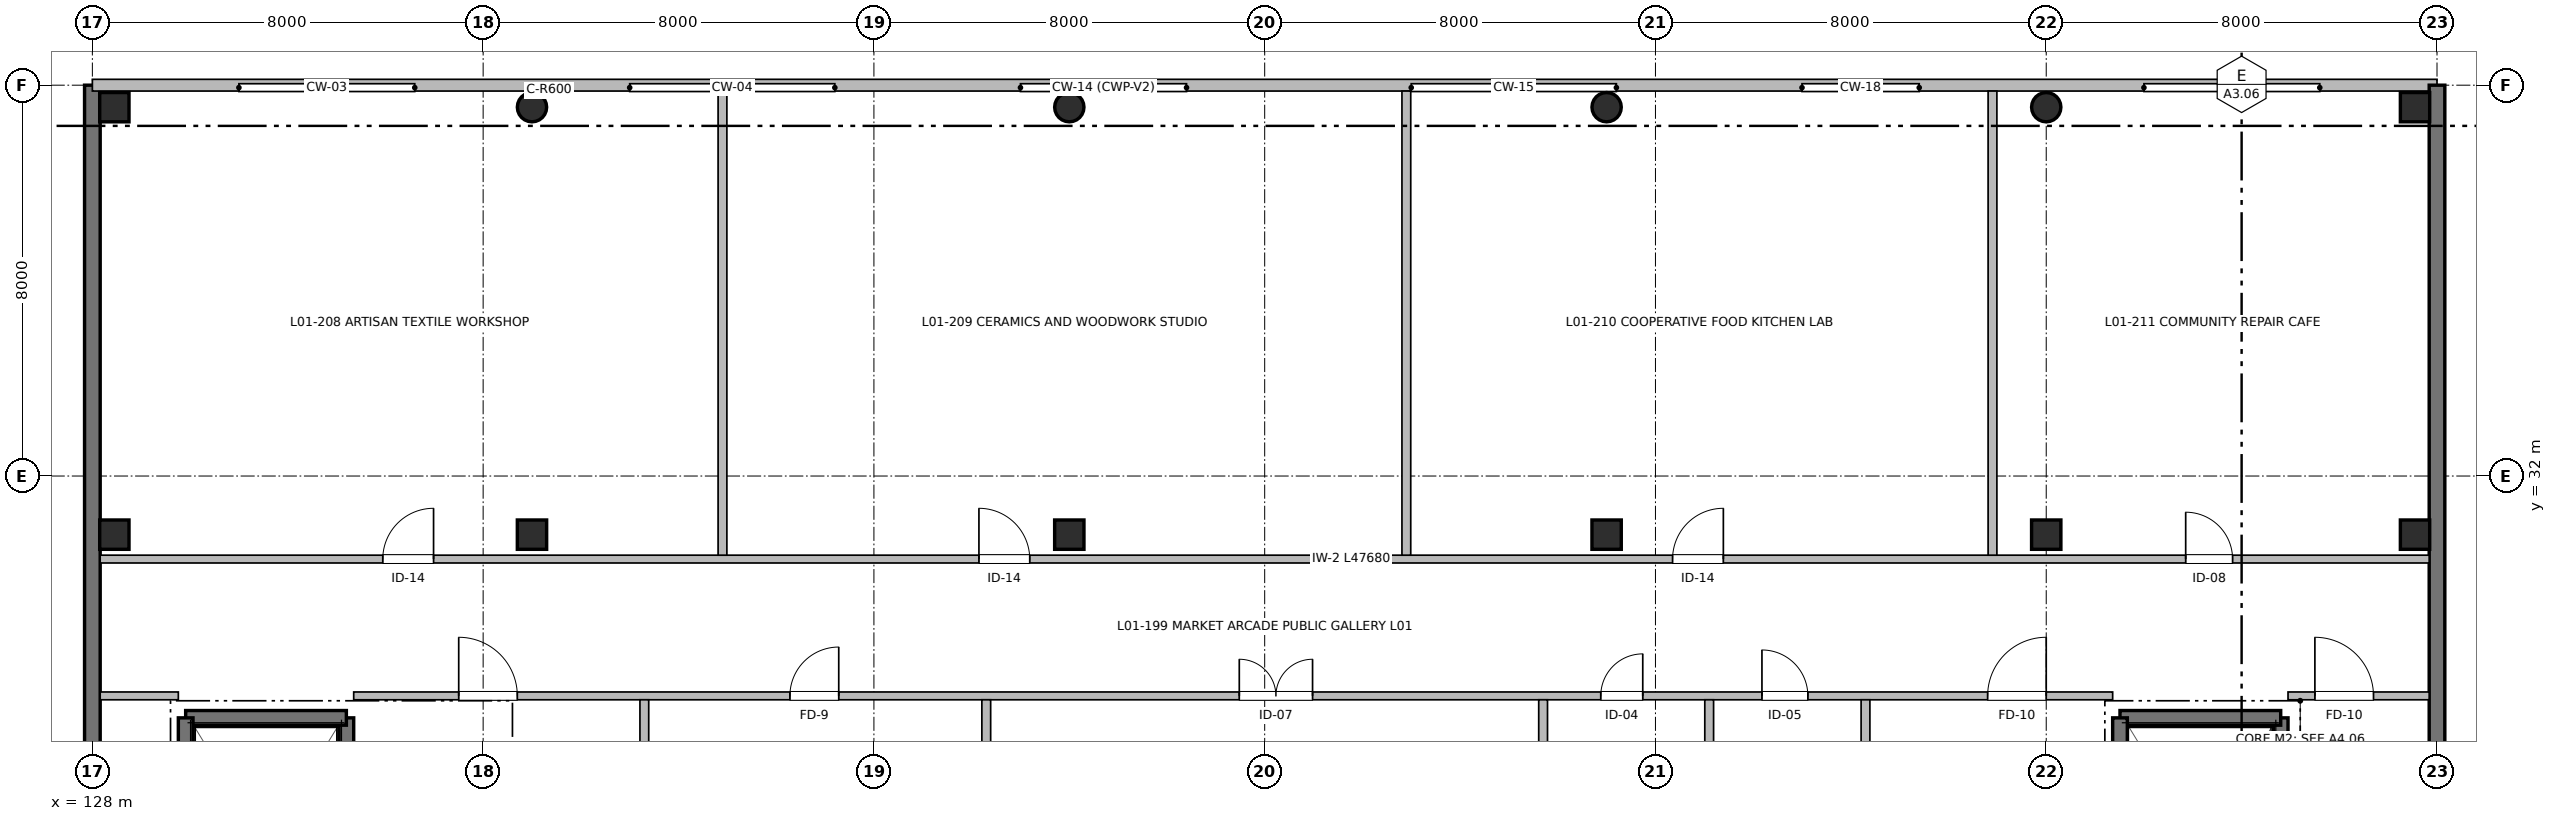
"""IFC4 building model, lengths in metres.
Left out: names, types, materials, properties, quantities, classifications, styles, units other than length and angle.
Written with IfcOpenShell. Run it as: python <this file> out.ifc"""

import sys

from ifc_helpers import new_model, si_unit, direction, frame, frame_2d, origin, origin_2d, place, context, subcontext, project, spatial, rectangle, circle, extrude, element, fill, save


model = new_model("IFC4")
c1 = context("Model", 3, precision=1e-05, world=origin(), true_north=direction((0.0, 1.0)))
c2 = subcontext(c1, "Body", "Model", "MODEL_VIEW")
j1 = project(units=[si_unit("LENGTHUNIT", "METRE"), si_unit("PLANEANGLEUNIT", "RADIAN")], contexts=[c1])
p1 = place(None, origin())
s1 = spatial("IfcSite", under=j1, at=p1, CompositionType="ELEMENT")
p2 = place(p1, origin())
s2 = spatial("IfcBuilding", under=s1, at=p2, CompositionType="ELEMENT")
p3 = place(p2, frame((0.0, 0.0, 4.16)))
s3 = spatial("IfcBuildingStorey", under=s2, at=p3, CompositionType="ELEMENT", Elevation=4.16)
for number, where, z_axis, x_axis in (
    (1, (128.45, 30.8, 0.0), (0.0, 0.0, 1.0), (1.0, 0.0, 0.0)),
    (2, (128.45, 39.55, 0.0), (0.0, 0.0, 1.0), (1.0, 0.0, 0.0)),
    (3, (137.0, 30.8, 0.0), (0.0, 0.0, 1.0), (1.0, 0.0, 0.0)),
):
    element("IfcColumn", number, at=place(p3, frame(where, z_axis=z_axis, x_axis=x_axis)), inside=s3, PredefinedType="COLUMN", context=c2, shape_type="SweptSolid", body=[
        extrude(rectangle(XDim=0.6, YDim=0.6, at=origin_2d()), origin(), (0.0, 0.0, 1.0), 3.2),
    ])
p4 = place(p3, frame((137.0, 39.55, 0.0), z_axis=(0.0, 0.0, 1.0), x_axis=(1.0, 0.0, 0.0)))
e4 = element("IfcColumn", 4, at=p4, inside=s3, PredefinedType="COLUMN", context=c2, shape_type="SweptSolid", body=[
    extrude(circle(Radius=0.3, at=origin_2d()), origin(), (0.0, 0.0, 1.0), 3.2),
])
p5 = place(p3, frame((148.0, 30.8, 0.0), z_axis=(0.0, 0.0, 1.0), x_axis=(1.0, 0.0, 0.0)))
e5 = element("IfcColumn", 5, at=p5, inside=s3, PredefinedType="COLUMN", context=c2, shape_type="SweptSolid", body=[
    extrude(rectangle(XDim=0.6, YDim=0.6, at=origin_2d()), origin(), (0.0, 0.0, 1.0), 3.2),
])
p6 = place(p3, frame((148.0, 39.55, 0.0), z_axis=(0.0, 0.0, 1.0), x_axis=(1.0, 0.0, 0.0)))
e6 = element("IfcColumn", 6, at=p6, inside=s3, PredefinedType="COLUMN", context=c2, shape_type="SweptSolid", body=[
    extrude(circle(Radius=0.3, at=origin_2d()), origin(), (0.0, 0.0, 1.0), 3.2),
])
p7 = place(p3, frame((159.0, 30.8, 0.0), z_axis=(0.0, 0.0, 1.0), x_axis=(1.0, 0.0, 0.0)))
e7 = element("IfcColumn", 7, at=p7, inside=s3, PredefinedType="COLUMN", context=c2, shape_type="SweptSolid", body=[
    extrude(rectangle(XDim=0.6, YDim=0.6, at=origin_2d()), origin(), (0.0, 0.0, 1.0), 3.2),
])
p8 = place(p3, frame((159.0, 39.55, 0.0), z_axis=(0.0, 0.0, 1.0), x_axis=(1.0, 0.0, 0.0)))
e8 = element("IfcColumn", 8, at=p8, inside=s3, PredefinedType="COLUMN", context=c2, shape_type="SweptSolid", body=[
    extrude(circle(Radius=0.3, at=origin_2d()), origin(), (0.0, 0.0, 1.0), 3.2),
])
p9 = place(p3, frame((168.0, 30.8, 0.0), z_axis=(0.0, 0.0, 1.0), x_axis=(1.0, 0.0, 0.0)))
e9 = element("IfcColumn", 9, at=p9, inside=s3, PredefinedType="COLUMN", context=c2, shape_type="SweptSolid", body=[
    extrude(rectangle(XDim=0.6, YDim=0.6, at=origin_2d()), origin(), (0.0, 0.0, 1.0), 3.2),
])
p10 = place(p3, frame((168.0, 39.55, 0.0), z_axis=(0.0, 0.0, 1.0), x_axis=(1.0, 0.0, 0.0)))
e10 = element("IfcColumn", 10, at=p10, inside=s3, PredefinedType="COLUMN", context=c2, shape_type="SweptSolid", body=[
    extrude(circle(Radius=0.3, at=origin_2d()), origin(), (0.0, 0.0, 1.0), 3.2),
])
for number, where, z_axis, x_axis in (
    (11, (175.55, 30.8, 0.0), (0.0, 0.0, 1.0), (1.0, 0.0, 0.0)),
    (12, (175.55, 39.55, 0.0), (0.0, 0.0, 1.0), (1.0, 0.0, 0.0)),
):
    element("IfcColumn", number, at=place(p3, frame(where, z_axis=z_axis, x_axis=x_axis)), inside=s3, PredefinedType="COLUMN", context=c2, shape_type="SweptSolid", body=[
        extrude(rectangle(XDim=0.6, YDim=0.6, at=origin_2d()), origin(), (0.0, 0.0, 1.0), 3.2),
    ])
p11 = place(p3, frame((128.0, 12.0, 0.0), z_axis=(0.0, 0.0, 1.0), x_axis=(0.0, 1.0, 0.0)))
e13 = element("IfcWall", 13, at=p11, inside=s3, PredefinedType="SHEAR", context=c2, shape_type="SweptSolid", body=[
    extrude(rectangle(XDim=28.0, YDim=0.32, at=frame_2d((14.0, 0.0))), origin(), (0.0, 0.0, 1.0), 2.94),
])
p12 = place(p3, frame((128.0, 40.0, 0.0), z_axis=(0.0, 0.0, 1.0), x_axis=(1.0, 0.0, 0.0)))
e14 = element("IfcWall", 14, at=p12, inside=s3, PredefinedType="SOLIDWALL", context=c2, shape_type="SweptSolid", body=[
    extrude(rectangle(XDim=48.0, YDim=0.24, at=frame_2d((24.0, 0.0))), origin(), (0.0, 0.0, 1.0), 2.94),
])
p13 = place(p3, frame((176.0, 40.0, 0.0), z_axis=(0.0, 0.0, 1.0), x_axis=(0.0, -1.0, 0.0)))
e15 = element("IfcWall", 15, at=p13, inside=s3, PredefinedType="SHEAR", context=c2, shape_type="SweptSolid", body=[
    extrude(rectangle(XDim=28.0, YDim=0.32, at=frame_2d((14.0, 0.0))), origin(), (0.0, 0.0, 1.0), 2.94),
])
p14 = place(p3, frame((133.2, 27.05, 0.0), z_axis=(0.0, 0.0, 1.0), x_axis=(0.0, -1.0, 0.0)))
e16 = element("IfcWall", 16, at=p14, inside=s3, PredefinedType="SHEAR", context=c2, shape_type="SweptSolid", body=[
    extrude(rectangle(XDim=6.9, YDim=0.3, at=frame_2d((3.45, 0.0))), origin(), (0.0, 0.0, 1.0), 3.2),
])
p15 = place(p14, frame((5.3, 0.0, 0.0)))
e17 = element("IfcOpeningElement", 17, at=p15, cuts=e16, PredefinedType="OPENING", context=c2, shape_type="SweptSolid", body=[
    extrude(rectangle(XDim=1.2, YDim=2.2, at=frame_2d((0.6, 1.1))), frame((0.0, 0.16, 0.0), z_axis=(0.0, -1.0, 0.0), x_axis=(1.0, 0.0, 0.0)), (0.0, 0.0, 1.0), 0.32),
])
p16 = place(p3, frame((129.91, 27.05, 0.0), z_axis=(0.0, 0.0, 1.0), x_axis=(1.0, 0.0, 0.0)))
e18 = element("IfcWall", 18, at=p16, inside=s3, PredefinedType="SHEAR", context=c2, shape_type="SweptSolid", body=[
    extrude(rectangle(XDim=3.29, YDim=0.3, at=frame_2d((1.645, 0.0))), origin(), (0.0, 0.0, 1.0), 3.2),
])
for number, where, z_axis, x_axis in (
    (19, (129.91, 20.15, 0.0), (0.0, 0.0, 1.0), (0.0, 1.0, 0.0)),
    (20, (172.8, 27.05, 0.0), (0.0, 0.0, 1.0), (0.0, -1.0, 0.0)),
):
    element("IfcWall", number, at=place(p3, frame(where, z_axis=z_axis, x_axis=x_axis)), inside=s3, PredefinedType="SHEAR", context=c2, shape_type="SweptSolid", body=[
        extrude(rectangle(XDim=6.9, YDim=0.3, at=frame_2d((3.45, 0.0))), origin(), (0.0, 0.0, 1.0), 3.2),
    ])
p17 = place(p3, frame((169.51, 27.05, 0.0), z_axis=(0.0, 0.0, 1.0), x_axis=(1.0, 0.0, 0.0)))
e21 = element("IfcWall", 21, at=p17, inside=s3, PredefinedType="SHEAR", context=c2, shape_type="SweptSolid", body=[
    extrude(rectangle(XDim=3.29, YDim=0.3, at=frame_2d((1.645, 0.0))), origin(), (0.0, 0.0, 1.0), 3.2),
])
p18 = place(p3, frame((169.51, 20.15, 0.0), z_axis=(0.0, 0.0, 1.0), x_axis=(0.0, 1.0, 0.0)))
e22 = element("IfcWall", 22, at=p18, inside=s3, PredefinedType="SHEAR", context=c2, shape_type="SweptSolid", body=[
    extrude(rectangle(XDim=6.9, YDim=0.3, at=frame_2d((3.45, 0.0))), origin(), (0.0, 0.0, 1.0), 3.2),
])
p19 = place(p18, frame((0.7, 0.0, 0.0)))
e23 = element("IfcOpeningElement", 23, at=p19, cuts=e22, PredefinedType="OPENING", context=c2, shape_type="SweptSolid", body=[
    extrude(rectangle(XDim=1.2, YDim=2.2, at=frame_2d((0.6, 1.1))), frame((0.0, 0.16, 0.0), z_axis=(0.0, -1.0, 0.0), x_axis=(1.0, 0.0, 0.0)), (0.0, 0.0, 1.0), 0.32),
])
p20 = place(p3, frame((128.16, 27.5, 0.0), z_axis=(0.0, 0.0, 1.0), x_axis=(1.0, 0.0, 0.0)))
e24 = element("IfcWall", 24, at=p20, inside=s3, PredefinedType="PARTITIONING", context=c2, shape_type="SweptSolid", body=[
    extrude(rectangle(XDim=1.6, YDim=0.16, at=frame_2d((0.8, 0.0))), origin(), (0.0, 0.0, 1.0), 2.93),
])
p21 = place(p3, frame((133.35, 27.5, 0.0), z_axis=(0.0, 0.0, 1.0), x_axis=(1.0, 0.0, 0.0)))
e25 = element("IfcWall", 25, at=p21, inside=s3, PredefinedType="PARTITIONING", context=c2, shape_type="SweptSolid", body=[
    extrude(rectangle(XDim=36.01, YDim=0.16, at=frame_2d((18.005, 0.0))), origin(), (0.0, 0.0, 1.0), 2.93),
])
p22 = place(p21, frame((2.15, 0.0, 0.0)))
e26 = element("IfcOpeningElement", 26, at=p22, cuts=e25, PredefinedType="OPENING", context=c2, shape_type="SweptSolid", body=[
    extrude(rectangle(XDim=1.2, YDim=2.2, at=frame_2d((0.6, 1.1))), frame((0.0, 0.09, 0.0), z_axis=(0.0, -1.0, 0.0), x_axis=(1.0, 0.0, 0.0)), (0.0, 0.0, 1.0), 0.18),
])
p23 = place(p21, frame((33.45, 0.0, 0.0)))
e27 = element("IfcOpeningElement", 27, at=p23, cuts=e25, PredefinedType="OPENING", context=c2, shape_type="SweptSolid", body=[
    extrude(rectangle(XDim=1.2, YDim=2.2, at=frame_2d((0.6, 1.1))), frame((0.0, 0.09, 0.0), z_axis=(0.0, -1.0, 0.0), x_axis=(1.0, 0.0, 0.0)), (0.0, 0.0, 1.0), 0.18),
])
p24 = place(p21, frame((8.93, 0.0, 0.0)))
e28 = element("IfcOpeningElement", 28, at=p24, cuts=e25, PredefinedType="OPENING", context=c2, shape_type="SweptSolid", body=[
    extrude(rectangle(XDim=1.0, YDim=2.1, at=frame_2d((0.5, 1.05))), frame((0.0, 0.09, 0.0), z_axis=(0.0, -1.0, 0.0), x_axis=(1.0, 0.0, 0.0)), (0.0, 0.0, 1.0), 0.18),
])
p25 = place(p21, frame((18.13, 0.0, 0.0)))
e29 = element("IfcOpeningElement", 29, at=p25, cuts=e25, PredefinedType="OPENING", context=c2, shape_type="SweptSolid", body=[
    extrude(rectangle(XDim=1.5, YDim=2.2, at=frame_2d((0.75, 1.1))), frame((0.0, 0.09, 0.0), z_axis=(0.0, -1.0, 0.0), x_axis=(1.0, 0.0, 0.0)), (0.0, 0.0, 1.0), 0.18),
])
p26 = place(p21, frame((25.53, 0.0, 0.0)))
e30 = element("IfcOpeningElement", 30, at=p26, cuts=e25, PredefinedType="OPENING", context=c2, shape_type="SweptSolid", body=[
    extrude(rectangle(XDim=0.86, YDim=2.1, at=frame_2d((0.43, 1.05))), frame((0.0, 0.09, 0.0), z_axis=(0.0, -1.0, 0.0), x_axis=(1.0, 0.0, 0.0)), (0.0, 0.0, 1.0), 0.18),
])
p27 = place(p21, frame((28.83, 0.0, 0.0)))
e31 = element("IfcOpeningElement", 31, at=p27, cuts=e25, PredefinedType="OPENING", context=c2, shape_type="SweptSolid", body=[
    extrude(rectangle(XDim=0.94, YDim=2.1, at=frame_2d((0.47, 1.05))), frame((0.0, 0.09, 0.0), z_axis=(0.0, -1.0, 0.0), x_axis=(1.0, 0.0, 0.0)), (0.0, 0.0, 1.0), 0.18),
])
p28 = place(p3, frame((172.95, 27.5, 0.0), z_axis=(0.0, 0.0, 1.0), x_axis=(1.0, 0.0, 0.0)))
e32 = element("IfcWall", 32, at=p28, inside=s3, PredefinedType="PARTITIONING", context=c2, shape_type="SweptSolid", body=[
    extrude(rectangle(XDim=2.89, YDim=0.16, at=frame_2d((1.445, 0.0))), origin(), (0.0, 0.0, 1.0), 2.93),
])
p29 = place(p28, frame((0.55, 0.0, 0.0)))
e33 = element("IfcOpeningElement", 33, at=p29, cuts=e32, PredefinedType="OPENING", context=c2, shape_type="SweptSolid", body=[
    extrude(rectangle(XDim=1.2, YDim=2.2, at=frame_2d((0.6, 1.1))), frame((0.0, 0.09, 0.0), z_axis=(0.0, -1.0, 0.0), x_axis=(1.0, 0.0, 0.0)), (0.0, 0.0, 1.0), 0.18),
])
p30 = place(p3, frame((128.16, 30.3, 0.0), z_axis=(0.0, 0.0, 1.0), x_axis=(1.0, 0.0, 0.0)))
e34 = element("IfcWall", 34, at=p30, inside=s3, PredefinedType="PARTITIONING", context=c2, shape_type="SweptSolid", body=[
    extrude(rectangle(XDim=47.68, YDim=0.16, at=frame_2d((23.84, 0.0))), origin(), (0.0, 0.0, 1.0), 2.93),
])
p31 = place(p30, frame((5.785, 0.0, 0.0)))
e35 = element("IfcOpeningElement", 35, at=p31, cuts=e34, PredefinedType="OPENING", context=c2, shape_type="SweptSolid", body=[
    extrude(rectangle(XDim=1.04, YDim=2.15, at=frame_2d((0.52, 1.075))), frame((0.0, 0.09, 0.0), z_axis=(0.0, -1.0, 0.0), x_axis=(1.0, 0.0, 0.0)), (0.0, 0.0, 1.0), 0.18),
])
p32 = place(p30, frame((17.99, 0.0, 0.0)))
e36 = element("IfcOpeningElement", 36, at=p32, cuts=e34, PredefinedType="OPENING", context=c2, shape_type="SweptSolid", body=[
    extrude(rectangle(XDim=1.04, YDim=2.15, at=frame_2d((0.52, 1.075))), frame((0.0, 0.09, 0.0), z_axis=(0.0, -1.0, 0.0), x_axis=(1.0, 0.0, 0.0)), (0.0, 0.0, 1.0), 0.18),
])
p33 = place(p30, frame((32.19, 0.0, 0.0)))
e37 = element("IfcOpeningElement", 37, at=p33, cuts=e34, PredefinedType="OPENING", context=c2, shape_type="SweptSolid", body=[
    extrude(rectangle(XDim=1.04, YDim=2.15, at=frame_2d((0.52, 1.075))), frame((0.0, 0.09, 0.0), z_axis=(0.0, -1.0, 0.0), x_axis=(1.0, 0.0, 0.0)), (0.0, 0.0, 1.0), 0.18),
])
p34 = place(p30, frame((42.695, 0.0, 0.0)))
e38 = element("IfcOpeningElement", 38, at=p34, cuts=e34, PredefinedType="OPENING", context=c2, shape_type="SweptSolid", body=[
    extrude(rectangle(XDim=0.96, YDim=2.15, at=frame_2d((0.48, 1.075))), frame((0.0, 0.09, 0.0), z_axis=(0.0, -1.0, 0.0), x_axis=(1.0, 0.0, 0.0)), (0.0, 0.0, 1.0), 0.18),
])
for number, where, z_axis, x_axis in (
    (39, (139.3, 12.2, 0.0), (0.0, 0.0, 1.0), (0.0, 1.0, 0.0)),
    (40, (164.3, 12.2, 0.0), (0.0, 0.0, 1.0), (0.0, 1.0, 0.0)),
):
    element("IfcWall", number, at=place(p3, frame(where, z_axis=z_axis, x_axis=x_axis)), inside=s3, PredefinedType="PARTITIONING", context=c2, shape_type="SweptSolid", body=[
        extrude(rectangle(XDim=15.22, YDim=0.18, at=frame_2d((7.61, 0.0))), origin(), (0.0, 0.0, 1.0), 2.93),
    ])
for number, where, z_axis, x_axis in (
    (41, (140.9, 30.38, 0.0), (0.0, 0.0, 1.0), (0.0, 1.0, 0.0)),
    (42, (154.9, 30.38, 0.0), (0.0, 0.0, 1.0), (0.0, 1.0, 0.0)),
    (43, (166.9, 30.38, 0.0), (0.0, 0.0, 1.0), (0.0, 1.0, 0.0)),
):
    element("IfcWall", number, at=place(p3, frame(where, z_axis=z_axis, x_axis=x_axis)), inside=s3, PredefinedType="PARTITIONING", context=c2, shape_type="SweptSolid", body=[
        extrude(rectangle(XDim=9.5, YDim=0.18, at=frame_2d((4.75, 0.0))), origin(), (0.0, 0.0, 1.0), 2.93),
    ])
for number, where, z_axis, x_axis in (
    (44, (146.3, 12.2, 0.0), (0.0, 0.0, 1.0), (0.0, 1.0, 0.0)),
    (45, (157.7, 12.2, 0.0), (0.0, 0.0, 1.0), (0.0, 1.0, 0.0)),
    (46, (161.1, 12.2, 0.0), (0.0, 0.0, 1.0), (0.0, 1.0, 0.0)),
):
    element("IfcWall", number, at=place(p3, frame(where, z_axis=z_axis, x_axis=x_axis)), inside=s3, PredefinedType="PARTITIONING", context=c2, shape_type="SweptSolid", body=[
        extrude(rectangle(XDim=15.22, YDim=0.18, at=frame_2d((7.61, 0.0))), origin(), (0.0, 0.0, 1.0), 2.93),
    ])
p35 = place(p22, origin())
e47 = element("IfcDoor", 47, at=p35, inside=s3, OperationType="SINGLE_SWING_LEFT", PredefinedType="DOOR", context=c2, shape_type="SweptSolid", body=[
    extrude(rectangle(XDim=1.2, YDim=2.2, at=frame_2d((0.6, 1.1))), frame((0.0, 0.025, 0.0), z_axis=(0.0, -1.0, 0.0), x_axis=(1.0, 0.0, 0.0)), (0.0, 0.0, 1.0), 0.05),
])
fill(e26, e47)
p36 = place(p23, origin())
e48 = element("IfcDoor", 48, at=p36, inside=s3, OperationType="SINGLE_SWING_RIGHT", PredefinedType="DOOR", context=c2, shape_type="SweptSolid", body=[
    extrude(rectangle(XDim=1.2, YDim=2.2, at=frame_2d((0.6, 1.1))), frame((0.0, 0.025, 0.0), z_axis=(0.0, -1.0, 0.0), x_axis=(1.0, 0.0, 0.0)), (0.0, 0.0, 1.0), 0.05),
])
fill(e27, e48)
p37 = place(p29, origin())
e49 = element("IfcDoor", 49, at=p37, inside=s3, OperationType="SINGLE_SWING_LEFT", PredefinedType="DOOR", context=c2, shape_type="SweptSolid", body=[
    extrude(rectangle(XDim=1.2, YDim=2.2, at=frame_2d((0.6, 1.1))), frame((0.0, 0.025, 0.0), z_axis=(0.0, -1.0, 0.0), x_axis=(1.0, 0.0, 0.0)), (0.0, 0.0, 1.0), 0.05),
])
fill(e33, e49)
p38 = place(p31, origin())
e50 = element("IfcDoor", 50, at=p38, inside=s3, OperationType="SINGLE_SWING_RIGHT", PredefinedType="DOOR", context=c2, shape_type="SweptSolid", body=[
    extrude(rectangle(XDim=1.04, YDim=2.15, at=frame_2d((0.52, 1.075))), frame((0.0, 0.025, 0.0), z_axis=(0.0, -1.0, 0.0), x_axis=(1.0, 0.0, 0.0)), (0.0, 0.0, 1.0), 0.05),
])
fill(e35, e50)
p39 = place(p32, origin())
e51 = element("IfcDoor", 51, at=p39, inside=s3, OperationType="SINGLE_SWING_LEFT", PredefinedType="DOOR", context=c2, shape_type="SweptSolid", body=[
    extrude(rectangle(XDim=1.04, YDim=2.15, at=frame_2d((0.52, 1.075))), frame((0.0, 0.025, 0.0), z_axis=(0.0, -1.0, 0.0), x_axis=(1.0, 0.0, 0.0)), (0.0, 0.0, 1.0), 0.05),
])
fill(e36, e51)
p40 = place(p33, origin())
e52 = element("IfcDoor", 52, at=p40, inside=s3, OperationType="SINGLE_SWING_RIGHT", PredefinedType="DOOR", context=c2, shape_type="SweptSolid", body=[
    extrude(rectangle(XDim=1.04, YDim=2.15, at=frame_2d((0.52, 1.075))), frame((0.0, 0.025, 0.0), z_axis=(0.0, -1.0, 0.0), x_axis=(1.0, 0.0, 0.0)), (0.0, 0.0, 1.0), 0.05),
])
fill(e37, e52)
p41 = place(p34, origin())
e53 = element("IfcDoor", 53, at=p41, inside=s3, OperationType="SINGLE_SWING_LEFT", PredefinedType="DOOR", context=c2, shape_type="SweptSolid", body=[
    extrude(rectangle(XDim=0.96, YDim=2.15, at=frame_2d((0.48, 1.075))), frame((0.0, 0.025, 0.0), z_axis=(0.0, -1.0, 0.0), x_axis=(1.0, 0.0, 0.0)), (0.0, 0.0, 1.0), 0.05),
])
fill(e38, e53)
p42 = place(p24, origin())
e54 = element("IfcDoor", 54, at=p42, inside=s3, OperationType="SINGLE_SWING_RIGHT", PredefinedType="DOOR", context=c2, shape_type="SweptSolid", body=[
    extrude(rectangle(XDim=1.0, YDim=2.1, at=frame_2d((0.5, 1.05))), frame((0.0, 0.025, 0.0), z_axis=(0.0, -1.0, 0.0), x_axis=(1.0, 0.0, 0.0)), (0.0, 0.0, 1.0), 0.05),
])
fill(e28, e54)
p43 = place(p25, origin())
e55 = element("IfcDoor", 55, at=p43, inside=s3, OperationType="DOUBLE_DOOR_SINGLE_SWING", PredefinedType="DOOR", context=c2, shape_type="SweptSolid", body=[
    extrude(rectangle(XDim=1.5, YDim=2.2, at=frame_2d((0.75, 1.1))), frame((0.0, 0.025, 0.0), z_axis=(0.0, -1.0, 0.0), x_axis=(1.0, 0.0, 0.0)), (0.0, 0.0, 1.0), 0.05),
])
fill(e29, e55)
p44 = place(p26, origin())
e56 = element("IfcDoor", 56, at=p44, inside=s3, OperationType="SINGLE_SWING_RIGHT", PredefinedType="DOOR", context=c2, shape_type="SweptSolid", body=[
    extrude(rectangle(XDim=0.86, YDim=2.1, at=frame_2d((0.43, 1.05))), frame((0.0, 0.025, 0.0), z_axis=(0.0, -1.0, 0.0), x_axis=(1.0, 0.0, 0.0)), (0.0, 0.0, 1.0), 0.05),
])
fill(e30, e56)
p45 = place(p27, origin())
e57 = element("IfcDoor", 57, at=p45, inside=s3, OperationType="SINGLE_SWING_LEFT", PredefinedType="DOOR", context=c2, shape_type="SweptSolid", body=[
    extrude(rectangle(XDim=0.94, YDim=2.1, at=frame_2d((0.47, 1.05))), frame((0.0, 0.025, 0.0), z_axis=(0.0, -1.0, 0.0), x_axis=(1.0, 0.0, 0.0)), (0.0, 0.0, 1.0), 0.05),
])
fill(e31, e57)
save(model, sys.argv[1])
